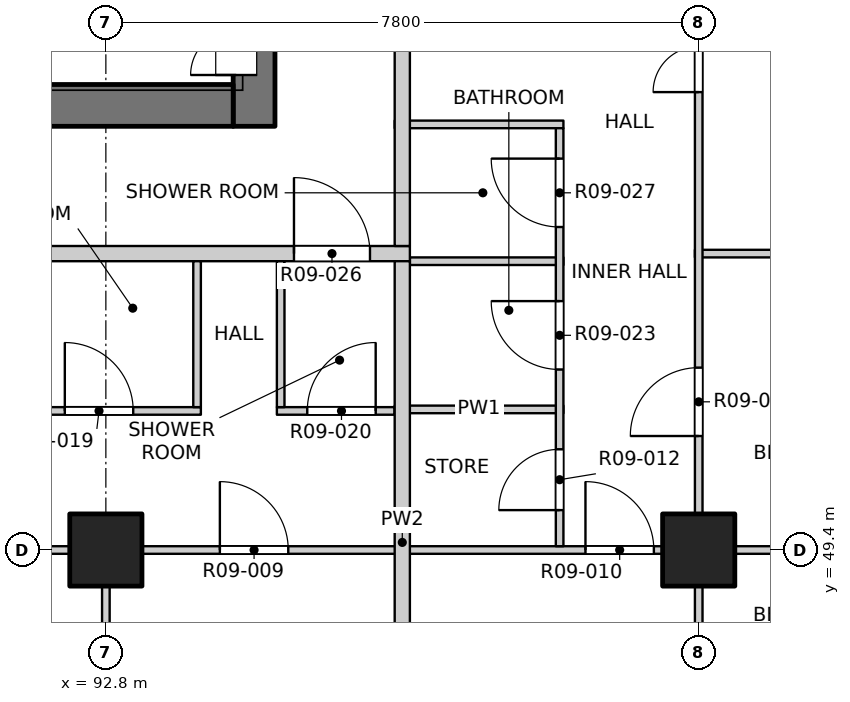
"""IFC4 building model, lengths in metres.
Left out: names, types, materials, properties, quantities, classifications, styles, units other than length and angle.
Written with IfcOpenShell. Run it as: python <this file> out.ifc"""

import sys

from ifc_helpers import new_model, si_unit, direction, frame, frame_2d, origin, origin_2d, place, context, subcontext, project, spatial, rectangle, extrude, element, fill, save


model = new_model("IFC4")
c1 = context("Model", 3, precision=1e-05, world=origin(), true_north=direction((0.0, 1.0)))
c2 = subcontext(c1, "Body", "Model", "MODEL_VIEW")
j1 = project(units=[si_unit("LENGTHUNIT", "METRE"), si_unit("PLANEANGLEUNIT", "RADIAN")], contexts=[c1])
p1 = place(None, origin())
s1 = spatial("IfcSite", under=j1, at=p1, CompositionType="ELEMENT")
p2 = place(p1, origin())
s2 = spatial("IfcBuilding", under=s1, at=p2, CompositionType="ELEMENT")
p3 = place(p2, frame((0.0, 0.0, 110.1)))
s3 = spatial("IfcBuildingStorey", under=s2, at=p3, CompositionType="ELEMENT", Elevation=110.1)
for number, where, z_axis, x_axis in (
    (1, (92.8, 49.4, -0.25), (0.0, 0.0, 1.0), (1.0, 0.0, 0.0)),
    (2, (100.6, 49.4, -0.25), (0.0, 0.0, 1.0), (1.0, 0.0, 0.0)),
):
    element("IfcColumn", number, at=place(p3, frame(where, z_axis=z_axis, x_axis=x_axis)), inside=s3, PredefinedType="COLUMN", context=c2, shape_type="SweptSolid", body=[
        extrude(rectangle(XDim=0.95, YDim=0.95, at=origin_2d()), origin(), (0.0, 0.0, 1.0), 3.4),
    ])
p4 = place(p3, frame((94.75, 54.975, -0.25), z_axis=(0.0, 0.0, 1.0), x_axis=(0.0, 1.0, 0.0)))
e3 = element("IfcWall", 3, at=p4, inside=s3, PredefinedType="SOLIDWALL", context=c2, shape_type="SweptSolid", body=[
    extrude(rectangle(XDim=6.975, YDim=0.55, at=frame_2d((3.487, 0.0))), origin(), (0.0, 0.0, 1.0), 3.4),
])
p5 = place(p4, frame((0.675, 0.0, 0.25)))
e4 = element("IfcOpeningElement", 4, at=p5, cuts=e3, PredefinedType="OPENING", context=c2, shape_type="SweptSolid", body=[
    extrude(rectangle(XDim=1.2, YDim=2.1, at=frame_2d((0.6, 1.05))), frame((0.0, 0.285, 0.0), z_axis=(0.0, -1.0, 0.0), x_axis=(1.0, 0.0, 0.0)), (0.0, 0.0, 1.0), 0.57),
])
p6 = place(p3, frame((75.525, 55.25, -0.25), z_axis=(0.0, 0.0, 1.0), x_axis=(1.0, 0.0, 0.0)))
e5 = element("IfcWall", 5, at=p6, inside=s3, PredefinedType="SOLIDWALL", context=c2, shape_type="SweptSolid", body=[
    extrude(rectangle(XDim=18.95, YDim=0.55, at=frame_2d((9.475, 0.0))), origin(), (0.0, 0.0, 1.0), 3.4),
])
p7 = place(p6, frame((8.725, 0.0, 0.25)))
e6 = element("IfcOpeningElement", 6, at=p7, cuts=e5, PredefinedType="OPENING", context=c2, shape_type="SweptSolid", body=[
    extrude(rectangle(XDim=1.5, YDim=2.1, at=frame_2d((0.75, 1.05))), frame((0.0, 0.285, 0.0), z_axis=(0.0, -1.0, 0.0), x_axis=(1.0, 0.0, 0.0)), (0.0, 0.0, 1.0), 0.57),
])
p8 = place(p3, frame((65.8, 49.4, 0.0), z_axis=(0.0, 0.0, 1.0), x_axis=(1.0, 0.0, 0.0)))
e7 = element("IfcWall", 7, at=p8, inside=s3, PredefinedType="PARTITIONING", context=c2, shape_type="SweptSolid", body=[
    extrude(rectangle(XDim=38.4, YDim=0.1, at=frame_2d((19.2, 0.0))), origin(), (0.0, 0.0, 1.0), 3.15),
])
p9 = place(p8, frame((4.19, 0.0, 0.0)))
e8 = element("IfcOpeningElement", 8, at=p9, cuts=e7, PredefinedType="OPENING", context=c2, shape_type="SweptSolid", body=[
    extrude(rectangle(XDim=0.9, YDim=2.1, at=frame_2d((0.45, 1.05))), frame((0.0, 0.06, 0.0), z_axis=(0.0, -1.0, 0.0), x_axis=(1.0, 0.0, 0.0)), (0.0, 0.0, 1.0), 0.12),
])
p10 = place(p8, frame((9.0, 0.0, 0.0)))
e9 = element("IfcOpeningElement", 9, at=p10, cuts=e7, PredefinedType="OPENING", context=c2, shape_type="SweptSolid", body=[
    extrude(rectangle(XDim=0.9, YDim=2.1, at=frame_2d((0.45, 1.05))), frame((0.0, 0.06, 0.0), z_axis=(0.0, -1.0, 0.0), x_axis=(1.0, 0.0, 0.0)), (0.0, 0.0, 1.0), 0.12),
])
p11 = place(p8, frame((12.9, 0.0, 0.0)))
e10 = element("IfcOpeningElement", 10, at=p11, cuts=e7, PredefinedType="OPENING", context=c2, shape_type="SweptSolid", body=[
    extrude(rectangle(XDim=0.9, YDim=2.1, at=frame_2d((0.45, 1.05))), frame((0.0, 0.06, 0.0), z_axis=(0.0, -1.0, 0.0), x_axis=(1.0, 0.0, 0.0)), (0.0, 0.0, 1.0), 0.12),
])
p12 = place(p8, frame((16.8, 0.0, 0.0)))
e11 = element("IfcOpeningElement", 11, at=p12, cuts=e7, PredefinedType="OPENING", context=c2, shape_type="SweptSolid", body=[
    extrude(rectangle(XDim=0.9, YDim=2.1, at=frame_2d((0.45, 1.05))), frame((0.0, 0.06, 0.0), z_axis=(0.0, -1.0, 0.0), x_axis=(1.0, 0.0, 0.0)), (0.0, 0.0, 1.0), 0.12),
])
p13 = place(p8, frame((20.7, 0.0, 0.0)))
e12 = element("IfcOpeningElement", 12, at=p13, cuts=e7, PredefinedType="OPENING", context=c2, shape_type="SweptSolid", body=[
    extrude(rectangle(XDim=0.9, YDim=2.1, at=frame_2d((0.45, 1.05))), frame((0.0, 0.06, 0.0), z_axis=(0.0, -1.0, 0.0), x_axis=(1.0, 0.0, 0.0)), (0.0, 0.0, 1.0), 0.12),
])
p14 = place(p8, frame((24.6, 0.0, 0.0)))
e13 = element("IfcOpeningElement", 13, at=p14, cuts=e7, PredefinedType="OPENING", context=c2, shape_type="SweptSolid", body=[
    extrude(rectangle(XDim=0.9, YDim=2.1, at=frame_2d((0.45, 1.05))), frame((0.0, 0.06, 0.0), z_axis=(0.0, -1.0, 0.0), x_axis=(1.0, 0.0, 0.0)), (0.0, 0.0, 1.0), 0.12),
])
p15 = place(p8, frame((28.5, 0.0, 0.0)))
e14 = element("IfcOpeningElement", 14, at=p15, cuts=e7, PredefinedType="OPENING", context=c2, shape_type="SweptSolid", body=[
    extrude(rectangle(XDim=0.9, YDim=2.1, at=frame_2d((0.45, 1.05))), frame((0.0, 0.06, 0.0), z_axis=(0.0, -1.0, 0.0), x_axis=(1.0, 0.0, 0.0)), (0.0, 0.0, 1.0), 0.12),
])
p16 = place(p8, frame((33.31, 0.0, 0.0)))
e15 = element("IfcOpeningElement", 15, at=p16, cuts=e7, PredefinedType="OPENING", context=c2, shape_type="SweptSolid", body=[
    extrude(rectangle(XDim=0.9, YDim=2.1, at=frame_2d((0.45, 1.05))), frame((0.0, 0.06, 0.0), z_axis=(0.0, -1.0, 0.0), x_axis=(1.0, 0.0, 0.0)), (0.0, 0.0, 1.0), 0.12),
])
p17 = place(p3, frame((83.35, 51.23, 0.0), z_axis=(0.0, 0.0, 1.0), x_axis=(1.0, 0.0, 0.0)))
e16 = element("IfcWall", 16, at=p17, inside=s3, PredefinedType="PARTITIONING", context=c2, shape_type="SweptSolid", body=[
    extrude(rectangle(XDim=10.7, YDim=0.1, at=frame_2d((5.35, 0.0))), origin(), (0.0, 0.0, 1.0), 3.15),
])
p18 = place(p17, frame((0.4, 0.0, 0.0)))
e17 = element("IfcOpeningElement", 17, at=p18, cuts=e16, PredefinedType="OPENING", context=c2, shape_type="SweptSolid", body=[
    extrude(rectangle(XDim=0.9, YDim=2.1, at=frame_2d((0.45, 1.05))), frame((0.0, 0.06, 0.0), z_axis=(0.0, -1.0, 0.0), x_axis=(1.0, 0.0, 0.0)), (0.0, 0.0, 1.0), 0.12),
])
p19 = place(p17, frame((2.7, 0.0, 0.0)))
e18 = element("IfcOpeningElement", 18, at=p19, cuts=e16, PredefinedType="OPENING", context=c2, shape_type="SweptSolid", body=[
    extrude(rectangle(XDim=0.8, YDim=2.1, at=frame_2d((0.4, 1.05))), frame((0.0, 0.06, 0.0), z_axis=(0.0, -1.0, 0.0), x_axis=(1.0, 0.0, 0.0)), (0.0, 0.0, 1.0), 0.12),
])
p20 = place(p17, frame((5.86, 0.0, 0.0)))
e19 = element("IfcOpeningElement", 19, at=p20, cuts=e16, PredefinedType="OPENING", context=c2, shape_type="SweptSolid", body=[
    extrude(rectangle(XDim=0.9, YDim=2.1, at=frame_2d((0.45, 1.05))), frame((0.0, 0.06, 0.0), z_axis=(0.0, -1.0, 0.0), x_axis=(1.0, 0.0, 0.0)), (0.0, 0.0, 1.0), 0.12),
])
p21 = place(p17, frame((8.91, 0.0, 0.0)))
e20 = element("IfcOpeningElement", 20, at=p21, cuts=e16, PredefinedType="OPENING", context=c2, shape_type="SweptSolid", body=[
    extrude(rectangle(XDim=0.9, YDim=2.1, at=frame_2d((0.45, 1.05))), frame((0.0, 0.06, 0.0), z_axis=(0.0, -1.0, 0.0), x_axis=(1.0, 0.0, 0.0)), (0.0, 0.0, 1.0), 0.12),
])
p22 = place(p3, frame((95.05, 51.23, 0.0), z_axis=(0.0, 0.0, 1.0), x_axis=(1.0, 0.0, 0.0)))
e21 = element("IfcWall", 21, at=p22, inside=s3, PredefinedType="PARTITIONING", context=c2, shape_type="SweptSolid", body=[
    extrude(rectangle(XDim=1.55, YDim=0.1, at=frame_2d((0.775, 0.0))), origin(), (0.0, 0.0, 1.0), 3.15),
])
p23 = place(p22, frame((0.4, 0.0, 0.0)))
e22 = element("IfcOpeningElement", 22, at=p23, cuts=e21, PredefinedType="OPENING", context=c2, shape_type="SweptSolid", body=[
    extrude(rectangle(XDim=0.9, YDim=2.1, at=frame_2d((0.45, 1.05))), frame((0.0, 0.06, 0.0), z_axis=(0.0, -1.0, 0.0), x_axis=(1.0, 0.0, 0.0)), (0.0, 0.0, 1.0), 0.12),
])
p24 = place(p3, frame((96.6, 51.25, 0.0), z_axis=(0.0, 0.0, 1.0), x_axis=(1.0, 0.0, 0.0)))
e23 = element("IfcWall", 23, at=p24, inside=s3, PredefinedType="PARTITIONING", context=c2, shape_type="SweptSolid", body=[
    extrude(rectangle(XDim=2.22, YDim=0.1, at=frame_2d((1.11, 0.0))), origin(), (0.0, 0.0, 1.0), 3.15),
])
p25 = place(p3, frame((96.8, 53.2, 0.0), z_axis=(0.0, 0.0, 1.0), x_axis=(1.0, 0.0, 0.0)))
e24 = element("IfcWall", 24, at=p25, inside=s3, PredefinedType="PARTITIONING", context=c2, shape_type="SweptSolid", body=[
    extrude(rectangle(XDim=2.02, YDim=0.1, at=frame_2d((1.01, 0.0))), origin(), (0.0, 0.0, 1.0), 3.15),
])
p26 = place(p3, frame((73.2, 53.3, 0.0), z_axis=(0.0, 0.0, 1.0), x_axis=(1.0, 0.0, 0.0)))
e25 = element("IfcWall", 25, at=p26, inside=s3, PredefinedType="PARTITIONING", context=c2, shape_type="SweptSolid", body=[
    extrude(rectangle(XDim=23.6, YDim=0.2, at=frame_2d((11.8, 0.0))), origin(), (0.0, 0.0, 1.0), 3.15),
])
p27 = place(p26, frame((10.375, 0.0, 0.0)))
e26 = element("IfcOpeningElement", 26, at=p27, cuts=e25, PredefinedType="OPENING", context=c2, shape_type="SweptSolid", body=[
    extrude(rectangle(XDim=1.0, YDim=2.1, at=frame_2d((0.5, 1.05))), frame((0.0, 0.11, 0.0), z_axis=(0.0, -1.0, 0.0), x_axis=(1.0, 0.0, 0.0)), (0.0, 0.0, 1.0), 0.22),
])
p28 = place(p26, frame((22.075, 0.0, 0.0)))
e27 = element("IfcOpeningElement", 27, at=p28, cuts=e25, PredefinedType="OPENING", context=c2, shape_type="SweptSolid", body=[
    extrude(rectangle(XDim=1.0, YDim=2.1, at=frame_2d((0.5, 1.05))), frame((0.0, 0.11, 0.0), z_axis=(0.0, -1.0, 0.0), x_axis=(1.0, 0.0, 0.0)), (0.0, 0.0, 1.0), 0.22),
])
p29 = place(p3, frame((100.55, 53.3, 0.0), z_axis=(0.0, 0.0, 1.0), x_axis=(1.0, 0.0, 0.0)))
e28 = element("IfcWall", 28, at=p29, inside=s3, PredefinedType="PARTITIONING", context=c2, shape_type="SweptSolid", body=[
    extrude(rectangle(XDim=3.65, YDim=0.1, at=frame_2d((1.825, 0.0))), origin(), (0.0, 0.0, 1.0), 3.15),
])
p30 = place(p3, frame((96.6, 55.0, 0.0), z_axis=(0.0, 0.0, 1.0), x_axis=(1.0, 0.0, 0.0)))
e29 = element("IfcWall", 29, at=p30, inside=s3, PredefinedType="PARTITIONING", context=c2, shape_type="SweptSolid", body=[
    extrude(rectangle(XDim=2.22, YDim=0.1, at=frame_2d((1.11, 0.0))), origin(), (0.0, 0.0, 1.0), 3.15),
])
p31 = place(p3, frame((92.8, 45.8, 0.0), z_axis=(0.0, 0.0, 1.0), x_axis=(0.0, 1.0, 0.0)))
e30 = element("IfcWall", 30, at=p31, inside=s3, PredefinedType="PARTITIONING", context=c2, shape_type="SweptSolid", body=[
    extrude(rectangle(XDim=3.55, YDim=0.1, at=frame_2d((1.775, 0.0))), origin(), (0.0, 0.0, 1.0), 3.15),
])
for number, where, z_axis, x_axis in (
    (31, (94.0, 51.28, 0.0), (0.0, 0.0, 1.0), (0.0, 1.0, 0.0)),
    (32, (95.1, 51.28, 0.0), (0.0, 0.0, 1.0), (0.0, 1.0, 0.0)),
):
    element("IfcWall", number, at=place(p3, frame(where, z_axis=z_axis, x_axis=x_axis)), inside=s3, PredefinedType="PARTITIONING", context=c2, shape_type="SweptSolid", body=[
        extrude(rectangle(XDim=1.92, YDim=0.1, at=frame_2d((0.96, 0.0))), origin(), (0.0, 0.0, 1.0), 3.15),
    ])
p32 = place(p3, frame((96.7, 45.8, 0.0), z_axis=(0.0, 0.0, 1.0), x_axis=(0.0, 1.0, 0.0)))
e33 = element("IfcWall", 33, at=p32, inside=s3, PredefinedType="PARTITIONING", context=c2, shape_type="SweptSolid", body=[
    extrude(rectangle(XDim=7.4, YDim=0.2, at=frame_2d((3.7, 0.0))), origin(), (0.0, 0.0, 1.0), 3.15),
])
p33 = place(p3, frame((96.7, 53.4, 0.0), z_axis=(0.0, 0.0, 1.0), x_axis=(0.0, 1.0, 0.0)))
e34 = element("IfcWall", 34, at=p33, inside=s3, PredefinedType="PARTITIONING", context=c2, shape_type="SweptSolid", body=[
    extrude(rectangle(XDim=30.8, YDim=0.2, at=frame_2d((15.4, 0.0))), origin(), (0.0, 0.0, 1.0), 3.15),
])
p34 = place(p33, frame((2.875, 0.0, 0.0)))
e35 = element("IfcOpeningElement", 35, at=p34, cuts=e34, PredefinedType="OPENING", context=c2, shape_type="SweptSolid", body=[
    extrude(rectangle(XDim=1.0, YDim=2.1, at=frame_2d((0.5, 1.05))), frame((0.0, 0.11, 0.0), z_axis=(0.0, -1.0, 0.0), x_axis=(1.0, 0.0, 0.0)), (0.0, 0.0, 1.0), 0.22),
])
p35 = place(p33, frame((14.775, 0.0, 0.0)))
e36 = element("IfcOpeningElement", 36, at=p35, cuts=e34, PredefinedType="OPENING", context=c2, shape_type="SweptSolid", body=[
    extrude(rectangle(XDim=1.0, YDim=2.1, at=frame_2d((0.5, 1.05))), frame((0.0, 0.11, 0.0), z_axis=(0.0, -1.0, 0.0), x_axis=(1.0, 0.0, 0.0)), (0.0, 0.0, 1.0), 0.22),
])
p36 = place(p33, frame((20.025, 0.0, 0.0)))
e37 = element("IfcOpeningElement", 37, at=p36, cuts=e34, PredefinedType="OPENING", context=c2, shape_type="SweptSolid", body=[
    extrude(rectangle(XDim=1.0, YDim=2.1, at=frame_2d((0.5, 1.05))), frame((0.0, 0.11, 0.0), z_axis=(0.0, -1.0, 0.0), x_axis=(1.0, 0.0, 0.0)), (0.0, 0.0, 1.0), 0.22),
])
p37 = place(p3, frame((98.77, 49.45, 0.0), z_axis=(0.0, 0.0, 1.0), x_axis=(0.0, 1.0, 0.0)))
e38 = element("IfcWall", 38, at=p37, inside=s3, PredefinedType="PARTITIONING", context=c2, shape_type="SweptSolid", body=[
    extrude(rectangle(XDim=5.5, YDim=0.1, at=frame_2d((2.75, 0.0))), origin(), (0.0, 0.0, 1.0), 3.15),
])
p38 = place(p37, frame((0.475, 0.0, 0.0)))
e39 = element("IfcOpeningElement", 39, at=p38, cuts=e38, PredefinedType="OPENING", context=c2, shape_type="SweptSolid", body=[
    extrude(rectangle(XDim=0.8, YDim=2.1, at=frame_2d((0.4, 1.05))), frame((0.0, 0.06, 0.0), z_axis=(0.0, -1.0, 0.0), x_axis=(1.0, 0.0, 0.0)), (0.0, 0.0, 1.0), 0.12),
])
p39 = place(p37, frame((2.325, 0.0, 0.0)))
e40 = element("IfcOpeningElement", 40, at=p39, cuts=e38, PredefinedType="OPENING", context=c2, shape_type="SweptSolid", body=[
    extrude(rectangle(XDim=0.9, YDim=2.1, at=frame_2d((0.45, 1.05))), frame((0.0, 0.06, 0.0), z_axis=(0.0, -1.0, 0.0), x_axis=(1.0, 0.0, 0.0)), (0.0, 0.0, 1.0), 0.12),
])
p40 = place(p37, frame((4.2, 0.0, 0.0)))
e41 = element("IfcOpeningElement", 41, at=p40, cuts=e38, PredefinedType="OPENING", context=c2, shape_type="SweptSolid", body=[
    extrude(rectangle(XDim=0.9, YDim=2.1, at=frame_2d((0.45, 1.05))), frame((0.0, 0.06, 0.0), z_axis=(0.0, -1.0, 0.0), x_axis=(1.0, 0.0, 0.0)), (0.0, 0.0, 1.0), 0.12),
])
p41 = place(p3, frame((100.6, 45.8, 0.0), z_axis=(0.0, 0.0, 1.0), x_axis=(0.0, 1.0, 0.0)))
e42 = element("IfcWall", 42, at=p41, inside=s3, PredefinedType="PARTITIONING", context=c2, shape_type="SweptSolid", body=[
    extrude(rectangle(XDim=38.4, YDim=0.1, at=frame_2d((19.2, 0.0))), origin(), (0.0, 0.0, 1.0), 3.15),
])
p42 = place(p41, frame((1.05, 0.0, 0.0)))
e43 = element("IfcOpeningElement", 43, at=p42, cuts=e42, PredefinedType="OPENING", context=c2, shape_type="SweptSolid", body=[
    extrude(rectangle(XDim=1.2, YDim=2.1, at=frame_2d((0.6, 1.05))), frame((0.0, 0.06, 0.0), z_axis=(0.0, -1.0, 0.0), x_axis=(1.0, 0.0, 0.0)), (0.0, 0.0, 1.0), 0.12),
])
p43 = place(p41, frame((5.1, 0.0, 0.0)))
e44 = element("IfcOpeningElement", 44, at=p43, cuts=e42, PredefinedType="OPENING", context=c2, shape_type="SweptSolid", body=[
    extrude(rectangle(XDim=0.9, YDim=2.1, at=frame_2d((0.45, 1.05))), frame((0.0, 0.06, 0.0), z_axis=(0.0, -1.0, 0.0), x_axis=(1.0, 0.0, 0.0)), (0.0, 0.0, 1.0), 0.12),
])
p44 = place(p41, frame((9.625, 0.0, 0.0)))
e45 = element("IfcOpeningElement", 45, at=p44, cuts=e42, PredefinedType="OPENING", context=c2, shape_type="SweptSolid", body=[
    extrude(rectangle(XDim=1.2, YDim=2.1, at=frame_2d((0.6, 1.05))), frame((0.0, 0.06, 0.0), z_axis=(0.0, -1.0, 0.0), x_axis=(1.0, 0.0, 0.0)), (0.0, 0.0, 1.0), 0.12),
])
p45 = place(p41, frame((16.8, 0.0, 0.0)))
e46 = element("IfcOpeningElement", 46, at=p45, cuts=e42, PredefinedType="OPENING", context=c2, shape_type="SweptSolid", body=[
    extrude(rectangle(XDim=0.9, YDim=2.1, at=frame_2d((0.45, 1.05))), frame((0.0, 0.06, 0.0), z_axis=(0.0, -1.0, 0.0), x_axis=(1.0, 0.0, 0.0)), (0.0, 0.0, 1.0), 0.12),
])
p46 = place(p41, frame((20.7, 0.0, 0.0)))
e47 = element("IfcOpeningElement", 47, at=p46, cuts=e42, PredefinedType="OPENING", context=c2, shape_type="SweptSolid", body=[
    extrude(rectangle(XDim=0.9, YDim=2.1, at=frame_2d((0.45, 1.05))), frame((0.0, 0.06, 0.0), z_axis=(0.0, -1.0, 0.0), x_axis=(1.0, 0.0, 0.0)), (0.0, 0.0, 1.0), 0.12),
])
p47 = place(p41, frame((24.6, 0.0, 0.0)))
e48 = element("IfcOpeningElement", 48, at=p47, cuts=e42, PredefinedType="OPENING", context=c2, shape_type="SweptSolid", body=[
    extrude(rectangle(XDim=0.9, YDim=2.1, at=frame_2d((0.45, 1.05))), frame((0.0, 0.06, 0.0), z_axis=(0.0, -1.0, 0.0), x_axis=(1.0, 0.0, 0.0)), (0.0, 0.0, 1.0), 0.12),
])
p48 = place(p41, frame((28.5, 0.0, 0.0)))
e49 = element("IfcOpeningElement", 49, at=p48, cuts=e42, PredefinedType="OPENING", context=c2, shape_type="SweptSolid", body=[
    extrude(rectangle(XDim=0.9, YDim=2.1, at=frame_2d((0.45, 1.05))), frame((0.0, 0.06, 0.0), z_axis=(0.0, -1.0, 0.0), x_axis=(1.0, 0.0, 0.0)), (0.0, 0.0, 1.0), 0.12),
])
p49 = place(p41, frame((32.4, 0.0, 0.0)))
e50 = element("IfcOpeningElement", 50, at=p49, cuts=e42, PredefinedType="OPENING", context=c2, shape_type="SweptSolid", body=[
    extrude(rectangle(XDim=0.9, YDim=2.1, at=frame_2d((0.45, 1.05))), frame((0.0, 0.06, 0.0), z_axis=(0.0, -1.0, 0.0), x_axis=(1.0, 0.0, 0.0)), (0.0, 0.0, 1.0), 0.12),
])
p50 = place(p41, frame((36.15, 0.0, 0.0)))
e51 = element("IfcOpeningElement", 51, at=p50, cuts=e42, PredefinedType="OPENING", context=c2, shape_type="SweptSolid", body=[
    extrude(rectangle(XDim=1.2, YDim=2.1, at=frame_2d((0.6, 1.05))), frame((0.0, 0.06, 0.0), z_axis=(0.0, -1.0, 0.0), x_axis=(1.0, 0.0, 0.0)), (0.0, 0.0, 1.0), 0.12),
])
p51 = place(p15, origin())
e52 = element("IfcDoor", 52, at=p51, inside=s3, OperationType="SINGLE_SWING_LEFT", PredefinedType="DOOR", context=c2, shape_type="SweptSolid", body=[
    extrude(rectangle(XDim=0.9, YDim=2.1, at=frame_2d((0.45, 1.05))), frame((0.0, 0.025, 0.0), z_axis=(0.0, -1.0, 0.0), x_axis=(1.0, 0.0, 0.0)), (0.0, 0.0, 1.0), 0.05),
])
fill(e14, e52)
p52 = place(p16, origin())
e53 = element("IfcDoor", 53, at=p52, inside=s3, OperationType="SINGLE_SWING_LEFT", PredefinedType="DOOR", context=c2, shape_type="SweptSolid", body=[
    extrude(rectangle(XDim=0.9, YDim=2.1, at=frame_2d((0.45, 1.05))), frame((0.0, 0.025, 0.0), z_axis=(0.0, -1.0, 0.0), x_axis=(1.0, 0.0, 0.0)), (0.0, 0.0, 1.0), 0.05),
])
fill(e15, e53)
p53 = place(p38, origin())
e54 = element("IfcDoor", 54, at=p53, inside=s3, OperationType="SINGLE_SWING_LEFT", PredefinedType="DOOR", context=c2, shape_type="SweptSolid", body=[
    extrude(rectangle(XDim=0.8, YDim=2.1, at=frame_2d((0.4, 1.05))), frame((0.0, 0.025, 0.0), z_axis=(0.0, -1.0, 0.0), x_axis=(1.0, 0.0, 0.0)), (0.0, 0.0, 1.0), 0.05),
])
fill(e39, e54)
p54 = place(p21, origin())
e55 = element("IfcDoor", 55, at=p54, inside=s3, OperationType="SINGLE_SWING_LEFT", PredefinedType="DOOR", context=c2, shape_type="SweptSolid", body=[
    extrude(rectangle(XDim=0.9, YDim=2.1, at=frame_2d((0.45, 1.05))), frame((0.0, 0.025, 0.0), z_axis=(0.0, -1.0, 0.0), x_axis=(1.0, 0.0, 0.0)), (0.0, 0.0, 1.0), 0.05),
])
fill(e20, e55)
p55 = place(p23, origin())
e56 = element("IfcDoor", 56, at=p55, inside=s3, OperationType="SINGLE_SWING_RIGHT", PredefinedType="DOOR", context=c2, shape_type="SweptSolid", body=[
    extrude(rectangle(XDim=0.9, YDim=2.1, at=frame_2d((0.45, 1.05))), frame((0.0, 0.025, 0.0), z_axis=(0.0, -1.0, 0.0), x_axis=(1.0, 0.0, 0.0)), (0.0, 0.0, 1.0), 0.05),
])
fill(e22, e56)
p56 = place(p43, origin())
e57 = element("IfcDoor", 57, at=p56, inside=s3, OperationType="SINGLE_SWING_LEFT", PredefinedType="DOOR", context=c2, shape_type="SweptSolid", body=[
    extrude(rectangle(XDim=0.9, YDim=2.1, at=frame_2d((0.45, 1.05))), frame((0.0, 0.025, 0.0), z_axis=(0.0, -1.0, 0.0), x_axis=(1.0, 0.0, 0.0)), (0.0, 0.0, 1.0), 0.05),
])
fill(e44, e57)
p57 = place(p39, origin())
e58 = element("IfcDoor", 58, at=p57, inside=s3, OperationType="SINGLE_SWING_RIGHT", PredefinedType="DOOR", context=c2, shape_type="SweptSolid", body=[
    extrude(rectangle(XDim=0.9, YDim=2.1, at=frame_2d((0.45, 1.05))), frame((0.0, 0.025, 0.0), z_axis=(0.0, -1.0, 0.0), x_axis=(1.0, 0.0, 0.0)), (0.0, 0.0, 1.0), 0.05),
])
fill(e40, e58)
p58 = place(p28, origin())
e59 = element("IfcDoor", 59, at=p58, inside=s3, OperationType="SINGLE_SWING_LEFT", PredefinedType="DOOR", context=c2, shape_type="SweptSolid", body=[
    extrude(rectangle(XDim=1.0, YDim=2.1, at=frame_2d((0.5, 1.05))), frame((0.0, 0.025, 0.0), z_axis=(0.0, -1.0, 0.0), x_axis=(1.0, 0.0, 0.0)), (0.0, 0.0, 1.0), 0.05),
])
fill(e27, e59)
p59 = place(p40, origin())
e60 = element("IfcDoor", 60, at=p59, inside=s3, OperationType="SINGLE_SWING_RIGHT", PredefinedType="DOOR", context=c2, shape_type="SweptSolid", body=[
    extrude(rectangle(XDim=0.9, YDim=2.1, at=frame_2d((0.45, 1.05))), frame((0.0, 0.025, 0.0), z_axis=(0.0, -1.0, 0.0), x_axis=(1.0, 0.0, 0.0)), (0.0, 0.0, 1.0), 0.05),
])
fill(e41, e60)
p60 = place(p44, origin())
e61 = element("IfcDoor", 61, at=p60, inside=s3, OperationType="DOUBLE_DOOR_SINGLE_SWING", PredefinedType="DOOR", context=c2, shape_type="SweptSolid", body=[
    extrude(rectangle(XDim=1.2, YDim=2.1, at=frame_2d((0.6, 1.05))), frame((0.0, 0.025, 0.0), z_axis=(0.0, -1.0, 0.0), x_axis=(1.0, 0.0, 0.0)), (0.0, 0.0, 1.0), 0.05),
])
fill(e45, e61)
p61 = place(p5, origin())
e62 = element("IfcDoor", 62, at=p61, inside=s3, OperationType="DOUBLE_DOOR_SINGLE_SWING", PredefinedType="DOOR", context=c2, shape_type="SweptSolid", body=[
    extrude(rectangle(XDim=1.2, YDim=2.1, at=frame_2d((0.6, 1.05))), frame((0.0, 0.26, 0.0), z_axis=(0.0, -1.0, 0.0), x_axis=(1.0, 0.0, 0.0)), (0.0, 0.0, 1.0), 0.05),
])
fill(e4, e62)
save(model, sys.argv[1])
